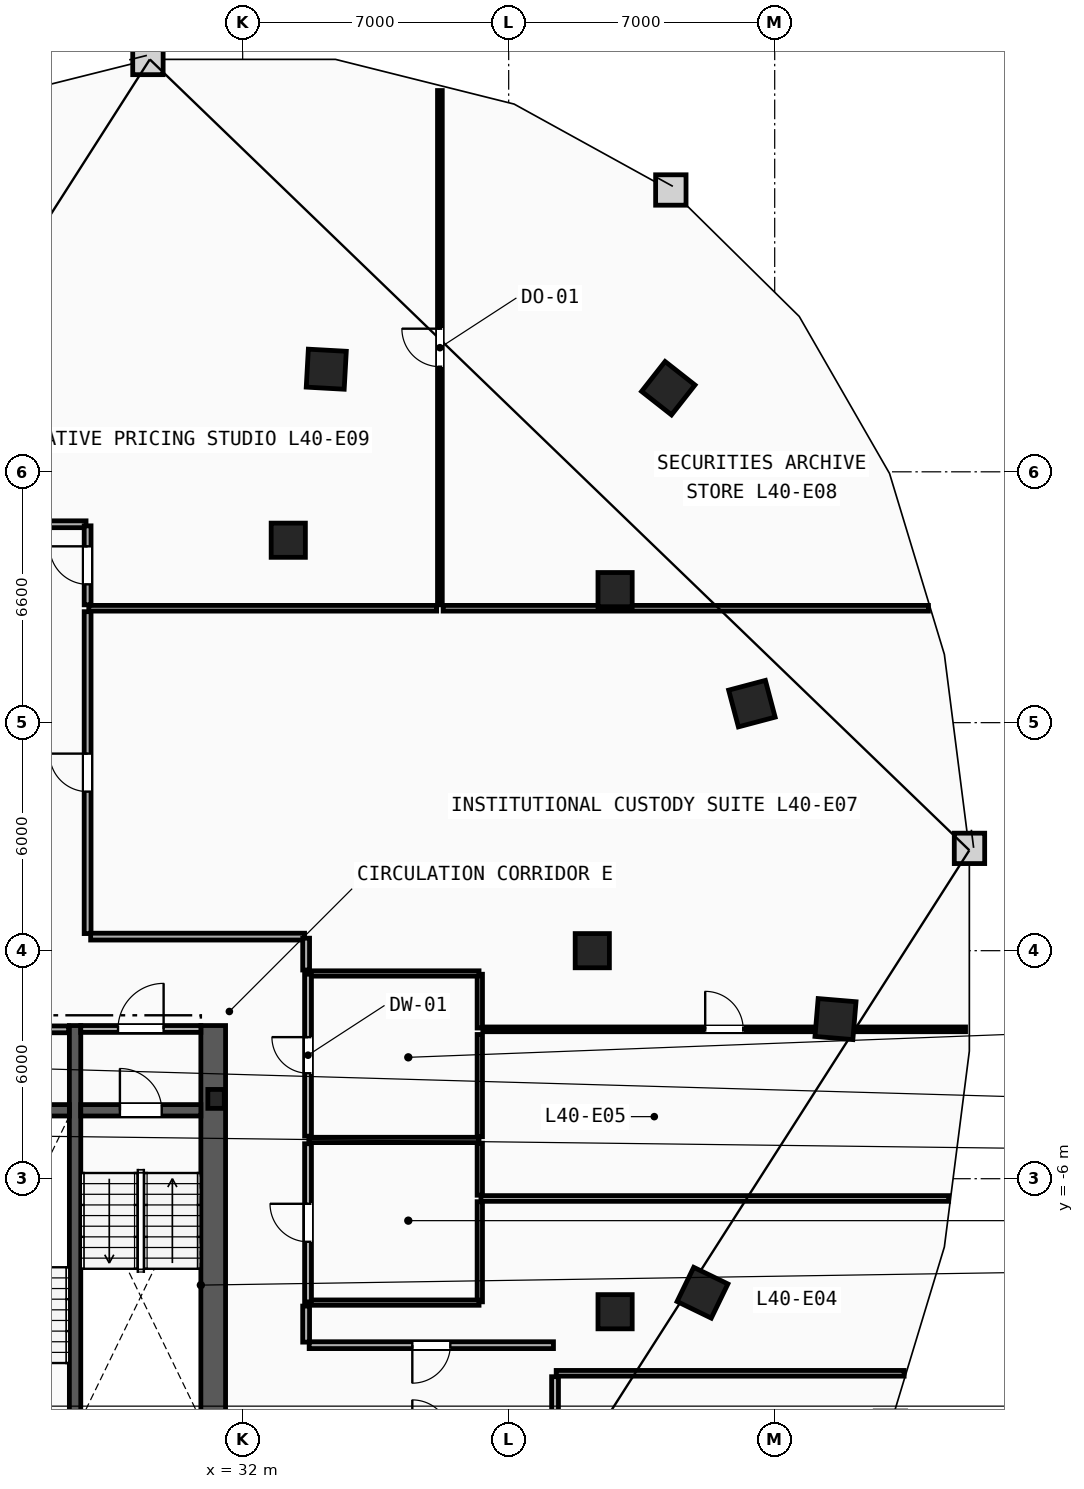
"""IFC4 building model, lengths in metres.
Left out: names, types, materials, properties, quantities, classifications, styles, units other than length and angle.
Written with IfcOpenShell. Run it as: python <this file> out.ifc"""

import sys

from ifc_helpers import new_model, si_unit, direction, frame, frame_2d, origin, origin_2d, place, context, subcontext, project, spatial, rectangle, i_section, extrude, element, fill, save


model = new_model("IFC4")
c1 = context("Model", 3, precision=1e-05, world=origin(), true_north=direction((0.0, 1.0)))
c2 = subcontext(c1, "Body", "Model", "MODEL_VIEW")
j1 = project(units=[si_unit("LENGTHUNIT", "METRE"), si_unit("PLANEANGLEUNIT", "RADIAN")], contexts=[c1])
p1 = place(None, origin())
s1 = spatial("IfcSite", under=j1, at=p1, CompositionType="ELEMENT")
p2 = place(p1, origin())
s2 = spatial("IfcBuilding", under=s1, at=p2, CompositionType="ELEMENT")
p3 = place(p2, frame((0.0, 0.0, 154.8)))
s3 = spatial("IfcBuildingStorey", under=s2, at=p3, CompositionType="ELEMENT", Elevation=154.8)
p4 = place(p3, frame((31.3, -3.9, 0.0), z_axis=(0.0, 0.0, 1.0), x_axis=(1.0, 0.0, 0.0)))
e1 = element("IfcColumn", 1, at=p4, inside=s3, PredefinedType="COLUMN", context=c2, shape_type="SweptSolid", body=[
    extrude(i_section(OverallWidth=0.432, OverallDepth=0.498, WebThickness=0.056, FlangeThickness=0.089, FilletRadius=0.018, at=origin_2d()), origin(), (0.0, 0.0, 1.0), 3.6),
])
for number, where, z_axis, x_axis in (
    (2, (41.2, 0.0, 0.0), (0.0, 0.0, 1.0), (1.0, 0.0, 0.0)),
    (3, (41.8, -9.5, 0.0), (0.0, 0.0, 1.0), (1.0, 0.0, 0.0)),
    (4, (41.8, 9.5, 0.0), (0.0, 0.0, 1.0), (1.0, 0.0, 0.0)),
    (5, (33.2, 10.8, 0.0), (0.0, 0.0, 1.0), (1.0, 0.0, 0.0)),
):
    element("IfcColumn", number, at=place(p3, frame(where, z_axis=z_axis, x_axis=x_axis)), inside=s3, PredefinedType="COLUMN", context=c2, shape_type="SweptSolid", body=[
        extrude(rectangle(XDim=0.9, YDim=0.9, at=origin_2d()), origin(), (0.0, 0.0, 1.0), 3.6),
    ])
for number, where, z_axis, x_axis in (
    (6, (44.1, -9.0, 0.0), (0.0, 0.0, 1.0), (0.437, 0.899, 0.0)),
    (7, (47.6, -1.8, 0.0), (0.0, 0.0, 1.0), (0.084, 0.997, 0.0)),
    (8, (45.4, 6.5, 0.0), (0.0, 0.0, 1.0), (-0.256, 0.967, 0.0)),
    (9, (43.2, 14.8, 0.0), (0.0, 0.0, 1.0), (-0.786, 0.618, 0.0)),
    (10, (34.2, 15.3, 0.0), (0.0, 0.0, 1.0), (-0.998, 0.055, 0.0)),
):
    element("IfcColumn", number, at=place(p3, frame(where, z_axis=z_axis, x_axis=x_axis)), inside=s3, PredefinedType="COLUMN", context=c2, shape_type="SweptSolid", body=[
        extrude(rectangle(XDim=1.0, YDim=1.0, at=origin_2d()), origin(), (0.0, 0.0, 1.0), 3.6),
    ])
p5 = place(p3, frame((31.225, -15.3, 0.0), z_axis=(0.0, 0.0, 1.0), x_axis=(0.0, 1.0, 0.0)))
e11 = element("IfcWall", 11, at=p5, inside=s3, PredefinedType="SHEAR", context=c2, shape_type="SweptSolid", body=[
    extrude(rectangle(XDim=13.33, YDim=0.65, at=frame_2d((6.665, 0.0))), origin(), (0.0, 0.0, 1.0), 3.36),
])
p6 = place(p3, frame((27.59, -12.65, 0.0), z_axis=(0.0, 0.0, 1.0), x_axis=(0.0, 1.0, 0.0)))
e12 = element("IfcWall", 12, at=p6, inside=s3, PredefinedType="SHEAR", context=c2, shape_type="SweptSolid", body=[
    extrude(rectangle(XDim=10.68, YDim=0.3, at=frame_2d((5.34, 0.0))), origin(), (0.0, 0.0, 1.0), 3.36),
])
p7 = place(p3, frame((27.74, -4.2, 0.0), z_axis=(0.0, 0.0, 1.0), x_axis=(1.0, 0.0, 0.0)))
e13 = element("IfcWall", 13, at=p7, inside=s3, PredefinedType="SHEAR", context=c2, shape_type="SweptSolid", body=[
    extrude(rectangle(XDim=3.16, YDim=0.3, at=frame_2d((1.58, 0.0))), origin(), (0.0, 0.0, 1.0), 3.36),
])
p8 = place(p7, frame((1.03, 0.0, 0.0)))
e14 = element("IfcOpeningElement", 14, at=p8, cuts=e13, PredefinedType="OPENING", context=c2, shape_type="SweptSolid", body=[
    extrude(rectangle(XDim=1.1, YDim=2.15, at=frame_2d((0.55, 1.075))), frame((0.0, 0.16, 0.0), z_axis=(0.0, -1.0, 0.0), x_axis=(1.0, 0.0, 0.0)), (0.0, 0.0, 1.0), 0.32),
])
p9 = place(p3, frame((24.28, -4.2, 0.0), z_axis=(0.0, 0.0, 1.0), x_axis=(1.0, 0.0, 0.0)))
e15 = element("IfcWall", 15, at=p9, inside=s3, PredefinedType="SHEAR", context=c2, shape_type="SweptSolid", body=[
    extrude(rectangle(XDim=3.16, YDim=0.3, at=frame_2d((1.58, 0.0))), origin(), (0.0, 0.0, 1.0), 3.36),
])
p10 = place(p3, frame((27.74, -2.06, 0.0), z_axis=(0.0, 0.0, 1.0), x_axis=(1.0, 0.0, 0.0)))
e16 = element("IfcWall", 16, at=p10, inside=s3, PredefinedType="PARTITIONING", context=c2, shape_type="SweptSolid", body=[
    extrude(rectangle(XDim=3.16, YDim=0.18, at=frame_2d((1.58, 0.0))), origin(), (0.0, 0.0, 1.0), 3.36),
])
p11 = place(p10, frame((0.98, 0.0, 0.0)))
e17 = element("IfcOpeningElement", 17, at=p11, cuts=e16, PredefinedType="OPENING", context=c2, shape_type="SweptSolid", body=[
    extrude(rectangle(XDim=1.2, YDim=2.15, at=frame_2d((0.6, 1.075))), frame((0.0, 0.1, 0.0), z_axis=(0.0, -1.0, 0.0), x_axis=(1.0, 0.0, 0.0)), (0.0, 0.0, 1.0), 0.2),
])
p12 = place(p3, frame((24.3, -2.07, 0.0), z_axis=(0.0, 0.0, 1.0), x_axis=(1.0, 0.0, 0.0)))
e18 = element("IfcWall", 18, at=p12, inside=s3, PredefinedType="PARTITIONING", context=c2, shape_type="SweptSolid", body=[
    extrude(rectangle(XDim=3.12, YDim=0.18, at=frame_2d((1.56, 0.0))), origin(), (0.0, 0.0, 1.0), 3.36),
])
p13 = place(p12, frame((1.085, 0.0, 0.0)))
e19 = element("IfcOpeningElement", 19, at=p13, cuts=e18, PredefinedType="OPENING", context=c2, shape_type="SweptSolid", body=[
    extrude(rectangle(XDim=0.95, YDim=2.1, at=frame_2d((0.475, 1.05))), frame((0.0, 0.1, 0.0), z_axis=(0.0, -1.0, 0.0), x_axis=(1.0, 0.0, 0.0)), (0.0, 0.0, 1.0), 0.2),
])
p14 = place(p3, frame((38.24, -9.24, 0.0), z_axis=(0.0, 0.0, 1.0), x_axis=(0.0, 1.0, 0.0)))
e20 = element("IfcWall", 20, at=p14, inside=s3, PredefinedType="PARTITIONING", context=c2, shape_type="SweptSolid", body=[
    extrude(rectangle(XDim=2.635, YDim=0.14, at=frame_2d((1.317, 0.0))), origin(), (0.0, 0.0, 1.0), 3.36),
])
p15 = place(p3, frame((38.24, -6.435, 0.0), z_axis=(0.0, 0.0, 1.0), x_axis=(0.0, 1.0, 0.0)))
e21 = element("IfcWall", 21, at=p15, inside=s3, PredefinedType="PARTITIONING", context=c2, shape_type="SweptSolid", body=[
    extrude(rectangle(XDim=1.37, YDim=0.14, at=frame_2d((0.685, 0.0))), origin(), (0.0, 0.0, 1.0), 3.36),
])
p16 = place(p3, frame((38.24, -4.895, 0.0), z_axis=(0.0, 0.0, 1.0), x_axis=(0.0, 1.0, 0.0)))
e22 = element("IfcWall", 22, at=p16, inside=s3, PredefinedType="PARTITIONING", context=c2, shape_type="SweptSolid", body=[
    extrude(rectangle(XDim=2.69, YDim=0.14, at=frame_2d((1.345, 0.0))), origin(), (0.0, 0.0, 1.0), 3.36),
])
p17 = place(p3, frame((38.24, -2.035, 0.0), z_axis=(0.0, 0.0, 1.0), x_axis=(0.0, 1.0, 0.0)))
e23 = element("IfcWall", 23, at=p17, inside=s3, PredefinedType="PARTITIONING", context=c2, shape_type="SweptSolid", body=[
    extrude(rectangle(XDim=1.415, YDim=0.14, at=frame_2d((0.708, 0.0))), origin(), (0.0, 0.0, 1.0), 3.36),
])
for number, where, z_axis, x_axis in (
    (24, (33.74, -0.6, 0.0), (0.0, 0.0, 1.0), (1.0, 0.0, 0.0)),
    (25, (33.74, -4.98, 0.0), (0.0, 0.0, 1.0), (1.0, 0.0, 0.0)),
    (26, (33.74, -9.26, 0.0), (0.0, 0.0, 1.0), (1.0, 0.0, 0.0)),
):
    element("IfcWall", number, at=place(p3, frame(where, z_axis=z_axis, x_axis=x_axis)), inside=s3, PredefinedType="PARTITIONING", context=c2, shape_type="SweptSolid", body=[
        extrude(rectangle(XDim=4.48, YDim=0.14, at=frame_2d((2.24, 0.0))), origin(), (0.0, 0.0, 1.0), 3.36),
    ])
p18 = place(p3, frame((33.72, -4.88, 0.0), z_axis=(0.0, 0.0, 1.0), x_axis=(0.0, 1.0, 0.0)))
e27 = element("IfcWall", 27, at=p18, inside=s3, PredefinedType="PARTITIONING", context=c2, shape_type="SweptSolid", body=[
    extrude(rectangle(XDim=4.26, YDim=0.18, at=frame_2d((2.13, 0.0))), origin(), (0.0, 0.0, 1.0), 3.36),
])
p19 = place(p18, frame((1.655, 0.0, 0.0)))
e28 = element("IfcOpeningElement", 28, at=p19, cuts=e27, PredefinedType="OPENING", context=c2, shape_type="SweptSolid", body=[
    extrude(rectangle(XDim=0.95, YDim=2.1, at=frame_2d((0.475, 1.05))), frame((0.0, 0.1, 0.0), z_axis=(0.0, -1.0, 0.0), x_axis=(1.0, 0.0, 0.0)), (0.0, 0.0, 1.0), 0.2),
])
p20 = place(p3, frame((33.72, -9.24, 0.0), z_axis=(0.0, 0.0, 1.0), x_axis=(0.0, 1.0, 0.0)))
e29 = element("IfcWall", 29, at=p20, inside=s3, PredefinedType="PARTITIONING", context=c2, shape_type="SweptSolid", body=[
    extrude(rectangle(XDim=4.16, YDim=0.18, at=frame_2d((2.08, 0.0))), origin(), (0.0, 0.0, 1.0), 3.36),
])
p21 = place(p20, frame((1.58, 0.0, 0.0)))
e30 = element("IfcOpeningElement", 30, at=p21, cuts=e29, PredefinedType="OPENING", context=c2, shape_type="SweptSolid", body=[
    extrude(rectangle(XDim=1.0, YDim=2.15, at=frame_2d((0.5, 1.075))), frame((0.0, 0.1, 0.0), z_axis=(0.0, -1.0, 0.0), x_axis=(1.0, 0.0, 0.0)), (0.0, 0.0, 1.0), 0.2),
])
p22 = place(p3, frame((27.95, 9.01, 0.0), z_axis=(0.0, 0.0, 1.0), x_axis=(1.0, 0.0, 0.0)))
e31 = element("IfcWall", 31, at=p22, inside=s3, PredefinedType="PARTITIONING", context=c2, shape_type="SweptSolid", body=[
    extrude(rectangle(XDim=9.155, YDim=0.15, at=frame_2d((4.578, 0.0))), origin(), (0.0, 0.0, 1.0), 3.36),
])
p23 = place(p3, frame((37.275, 9.01, 0.0), z_axis=(0.0, 0.0, 1.0), x_axis=(1.0, 0.0, 0.0)))
e32 = element("IfcWall", 32, at=p23, inside=s3, PredefinedType="PARTITIONING", context=c2, shape_type="SweptSolid", body=[
    extrude(rectangle(XDim=12.771, YDim=0.15, at=frame_2d((6.385, 0.0))), origin(), (0.0, 0.0, 1.0), 3.36),
])
p24 = place(p3, frame((38.27, -6.52, 0.0), z_axis=(0.0, 0.0, 1.0), x_axis=(1.0, 0.0, 0.0)))
e33 = element("IfcWall", 33, at=p24, inside=s3, PredefinedType="PARTITIONING", context=c2, shape_type="SweptSolid", body=[
    extrude(rectangle(XDim=12.307, YDim=0.15, at=frame_2d((6.154, 0.0))), origin(), (0.0, 0.0, 1.0), 3.36),
])
p25 = place(p3, frame((40.25, -11.12, 0.0), z_axis=(0.0, 0.0, 1.0), x_axis=(1.0, 0.0, 0.0)))
e34 = element("IfcWall", 34, at=p25, inside=s3, PredefinedType="PARTITIONING", context=c2, shape_type="SweptSolid", body=[
    extrude(rectangle(XDim=9.156, YDim=0.15, at=frame_2d((4.578, 0.0))), origin(), (0.0, 0.0, 1.0), 3.36),
])
p26 = place(p3, frame((40.22, -12.779, 0.0), z_axis=(0.0, 0.0, 1.0), x_axis=(0.0, 1.0, 0.0)))
e35 = element("IfcWall", 35, at=p26, inside=s3, PredefinedType="PARTITIONING", context=c2, shape_type="SweptSolid", body=[
    extrude(rectangle(XDim=1.569, YDim=0.18, at=frame_2d((0.784, 0.0))), origin(), (0.0, 0.0, 1.0), 3.36),
])
p27 = place(p3, frame((40.178, -10.38, 0.0), z_axis=(0.0, 0.0, 1.0), x_axis=(-1.0, 0.0, 0.0)))
e36 = element("IfcWall", 36, at=p27, inside=s3, PredefinedType="PARTITIONING", context=c2, shape_type="SweptSolid", body=[
    extrude(rectangle(XDim=6.428, YDim=0.18, at=frame_2d((3.214, 0.0))), origin(), (0.0, 0.0, 1.0), 3.36),
])
p28 = place(p27, frame((2.714, 0.0, 0.0)))
e37 = element("IfcOpeningElement", 37, at=p28, cuts=e36, PredefinedType="OPENING", context=c2, shape_type="SweptSolid", body=[
    extrude(rectangle(XDim=1.0, YDim=2.15, at=frame_2d((0.5, 1.075))), frame((0.0, 0.1, 0.0), z_axis=(0.0, -1.0, 0.0), x_axis=(1.0, 0.0, 0.0)), (0.0, 0.0, 1.0), 0.2),
])
p29 = place(p3, frame((33.67, -10.3, 0.0), z_axis=(0.0, 0.0, 1.0), x_axis=(0.0, 1.0, 0.0)))
e38 = element("IfcWall", 38, at=p29, inside=s3, PredefinedType="PARTITIONING", context=c2, shape_type="SweptSolid", body=[
    extrude(rectangle(XDim=0.949, YDim=0.18, at=frame_2d((0.474, 0.0))), origin(), (0.0, 0.0, 1.0), 3.36),
])
p30 = place(p3, frame((27.92, 0.45, 0.0), z_axis=(0.0, 0.0, 1.0), x_axis=(0.0, 1.0, 0.0)))
e39 = element("IfcWall", 39, at=p30, inside=s3, PredefinedType="PARTITIONING", context=c2, shape_type="SweptSolid", body=[
    extrude(rectangle(XDim=8.47, YDim=0.18, at=frame_2d((4.235, 0.0))), origin(), (0.0, 0.0, 1.0), 3.36),
])
p31 = place(p30, frame((3.735, 0.0, 0.0)))
e40 = element("IfcOpeningElement", 40, at=p31, cuts=e39, PredefinedType="OPENING", context=c2, shape_type="SweptSolid", body=[
    extrude(rectangle(XDim=1.0, YDim=2.15, at=frame_2d((0.5, 1.075))), frame((0.0, 0.1, 0.0), z_axis=(0.0, -1.0, 0.0), x_axis=(1.0, 0.0, 0.0)), (0.0, 0.0, 1.0), 0.2),
])
p32 = place(p3, frame((33.628, 0.37, 0.0), z_axis=(0.0, 0.0, 1.0), x_axis=(-1.0, 0.0, 0.0)))
e41 = element("IfcWall", 41, at=p32, inside=s3, PredefinedType="PARTITIONING", context=c2, shape_type="SweptSolid", body=[
    extrude(rectangle(XDim=5.628, YDim=0.18, at=frame_2d((2.814, 0.0))), origin(), (0.0, 0.0, 1.0), 3.36),
])
p33 = place(p3, frame((33.67, -0.509, 0.0), z_axis=(0.0, 0.0, 1.0), x_axis=(0.0, 1.0, 0.0)))
e42 = element("IfcWall", 42, at=p33, inside=s3, PredefinedType="PARTITIONING", context=c2, shape_type="SweptSolid", body=[
    extrude(rectangle(XDim=0.837, YDim=0.18, at=frame_2d((0.418, 0.0))), origin(), (0.0, 0.0, 1.0), 3.36),
])
p34 = place(p3, frame((27.878, 11.22, 0.0), z_axis=(0.0, 0.0, 1.0), x_axis=(-1.0, 0.0, 0.0)))
e43 = element("IfcWall", 43, at=p34, inside=s3, PredefinedType="PARTITIONING", context=c2, shape_type="SweptSolid", body=[
    extrude(rectangle(XDim=2.357, YDim=0.18, at=frame_2d((1.178, 0.0))), origin(), (0.0, 0.0, 1.0), 3.36),
])
p35 = place(p3, frame((27.92, 9.1, 0.0), z_axis=(0.0, 0.0, 1.0), x_axis=(0.0, 1.0, 0.0)))
e44 = element("IfcWall", 44, at=p35, inside=s3, PredefinedType="PARTITIONING", context=c2, shape_type="SweptSolid", body=[
    extrude(rectangle(XDim=2.078, YDim=0.18, at=frame_2d((1.039, 0.0))), origin(), (0.0, 0.0, 1.0), 3.36),
])
p36 = place(p35, frame((0.539, 0.0, 0.0)))
e45 = element("IfcOpeningElement", 45, at=p36, cuts=e44, PredefinedType="OPENING", context=c2, shape_type="SweptSolid", body=[
    extrude(rectangle(XDim=1.0, YDim=2.15, at=frame_2d((0.5, 1.075))), frame((0.0, 0.1, 0.0), z_axis=(0.0, -1.0, 0.0), x_axis=(1.0, 0.0, 0.0)), (0.0, 0.0, 1.0), 0.2),
])
p37 = place(p3, frame((38.32, -2.07, 0.0), z_axis=(0.0, 0.0, 1.0), x_axis=(1.0, 0.0, 0.0)))
e46 = element("IfcWall", 46, at=p37, inside=s3, PredefinedType="PARTITIONING", context=c2, shape_type="SweptSolid", body=[
    extrude(rectangle(XDim=12.702, YDim=0.125, at=frame_2d((6.351, 0.0))), origin(), (0.0, 0.0, 1.0), 3.36),
])
p38 = place(p37, frame((5.851, 0.0, 0.0)))
e47 = element("IfcOpeningElement", 47, at=p38, cuts=e46, PredefinedType="OPENING", context=c2, shape_type="SweptSolid", body=[
    extrude(rectangle(XDim=1.0, YDim=2.15, at=frame_2d((0.5, 1.075))), frame((0.0, 0.073, 0.0), z_axis=(0.0, -1.0, 0.0), x_axis=(1.0, 0.0, 0.0)), (0.0, 0.0, 1.0), 0.145),
])
p39 = place(p3, frame((37.19, 9.1, 0.0), z_axis=(0.0, 0.0, 1.0), x_axis=(0.0, 1.0, 0.0)))
e48 = element("IfcWall", 48, at=p39, inside=s3, PredefinedType="PARTITIONING", context=c2, shape_type="SweptSolid", body=[
    extrude(rectangle(XDim=13.532, YDim=0.125, at=frame_2d((6.766, 0.0))), origin(), (0.0, 0.0, 1.0), 3.36),
])
p40 = place(p39, frame((6.266, 0.0, 0.0)))
e49 = element("IfcOpeningElement", 49, at=p40, cuts=e48, PredefinedType="OPENING", context=c2, shape_type="SweptSolid", body=[
    extrude(rectangle(XDim=1.0, YDim=2.15, at=frame_2d((0.5, 1.075))), frame((0.0, 0.073, 0.0), z_axis=(0.0, -1.0, 0.0), x_axis=(1.0, 0.0, 0.0)), (0.0, 0.0, 1.0), 0.145),
])
p41 = place(p8, origin())
e50 = element("IfcDoor", 50, at=p41, inside=s3, OperationType="SINGLE_SWING_LEFT", PredefinedType="DOOR", context=c2, shape_type="SweptSolid", body=[
    extrude(rectangle(XDim=1.1, YDim=2.15, at=frame_2d((0.55, 1.075))), frame((0.0, 0.025, 0.0), z_axis=(0.0, -1.0, 0.0), x_axis=(1.0, 0.0, 0.0)), (0.0, 0.0, 1.0), 0.05),
])
fill(e14, e50)
p42 = place(p11, origin())
e51 = element("IfcDoor", 51, at=p42, inside=s3, OperationType="SINGLE_SWING_RIGHT", PredefinedType="DOOR", context=c2, shape_type="SweptSolid", body=[
    extrude(rectangle(XDim=1.2, YDim=2.15, at=frame_2d((0.6, 1.075))), frame((0.0, 0.025, 0.0), z_axis=(0.0, -1.0, 0.0), x_axis=(1.0, 0.0, 0.0)), (0.0, 0.0, 1.0), 0.05),
])
fill(e17, e51)
p43 = place(p40, origin())
e52 = element("IfcDoor", 52, at=p43, inside=s3, OperationType="SINGLE_SWING_RIGHT", PredefinedType="DOOR", context=c2, shape_type="SweptSolid", body=[
    extrude(rectangle(XDim=1.0, YDim=2.15, at=frame_2d((0.5, 1.075))), frame((0.0, 0.025, 0.0), z_axis=(0.0, -1.0, 0.0), x_axis=(1.0, 0.0, 0.0)), (0.0, 0.0, 1.0), 0.05),
])
fill(e49, e52)
p44 = place(p38, origin())
e53 = element("IfcDoor", 53, at=p44, inside=s3, OperationType="SINGLE_SWING_LEFT", PredefinedType="DOOR", context=c2, shape_type="SweptSolid", body=[
    extrude(rectangle(XDim=1.0, YDim=2.15, at=frame_2d((0.5, 1.075))), frame((0.0, 0.025, 0.0), z_axis=(0.0, -1.0, 0.0), x_axis=(1.0, 0.0, 0.0)), (0.0, 0.0, 1.0), 0.05),
])
fill(e47, e53)
p45 = place(p31, origin())
e54 = element("IfcDoor", 54, at=p45, inside=s3, OperationType="SINGLE_SWING_RIGHT", PredefinedType="DOOR", context=c2, shape_type="SweptSolid", body=[
    extrude(rectangle(XDim=1.0, YDim=2.15, at=frame_2d((0.5, 1.075))), frame((0.0, 0.025, 0.0), z_axis=(0.0, -1.0, 0.0), x_axis=(1.0, 0.0, 0.0)), (0.0, 0.0, 1.0), 0.05),
])
fill(e40, e54)
p46 = place(p28, origin())
e55 = element("IfcDoor", 55, at=p46, inside=s3, OperationType="SINGLE_SWING_RIGHT", PredefinedType="DOOR", context=c2, shape_type="SweptSolid", body=[
    extrude(rectangle(XDim=1.0, YDim=2.15, at=frame_2d((0.5, 1.075))), frame((0.0, 0.025, 0.0), z_axis=(0.0, -1.0, 0.0), x_axis=(1.0, 0.0, 0.0)), (0.0, 0.0, 1.0), 0.05),
])
fill(e37, e55)
p47 = place(p19, origin())
e56 = element("IfcDoor", 56, at=p47, inside=s3, OperationType="SINGLE_SWING_RIGHT", PredefinedType="DOOR", context=c2, shape_type="SweptSolid", body=[
    extrude(rectangle(XDim=0.95, YDim=2.1, at=frame_2d((0.475, 1.05))), frame((0.0, 0.025, 0.0), z_axis=(0.0, -1.0, 0.0), x_axis=(1.0, 0.0, 0.0)), (0.0, 0.0, 1.0), 0.05),
])
fill(e28, e56)
p48 = place(p21, origin())
e57 = element("IfcDoor", 57, at=p48, inside=s3, OperationType="SINGLE_SWING_RIGHT", PredefinedType="DOOR", context=c2, shape_type="SweptSolid", body=[
    extrude(rectangle(XDim=1.0, YDim=2.15, at=frame_2d((0.5, 1.075))), frame((0.0, 0.025, 0.0), z_axis=(0.0, -1.0, 0.0), x_axis=(1.0, 0.0, 0.0)), (0.0, 0.0, 1.0), 0.05),
])
fill(e30, e57)
p49 = place(p36, origin())
e58 = element("IfcDoor", 58, at=p49, inside=s3, OperationType="SINGLE_SWING_RIGHT", PredefinedType="DOOR", context=c2, shape_type="SweptSolid", body=[
    extrude(rectangle(XDim=1.0, YDim=2.15, at=frame_2d((0.5, 1.075))), frame((0.0, 0.025, 0.0), z_axis=(0.0, -1.0, 0.0), x_axis=(1.0, 0.0, 0.0)), (0.0, 0.0, 1.0), 0.05),
])
fill(e45, e58)
save(model, sys.argv[1])
